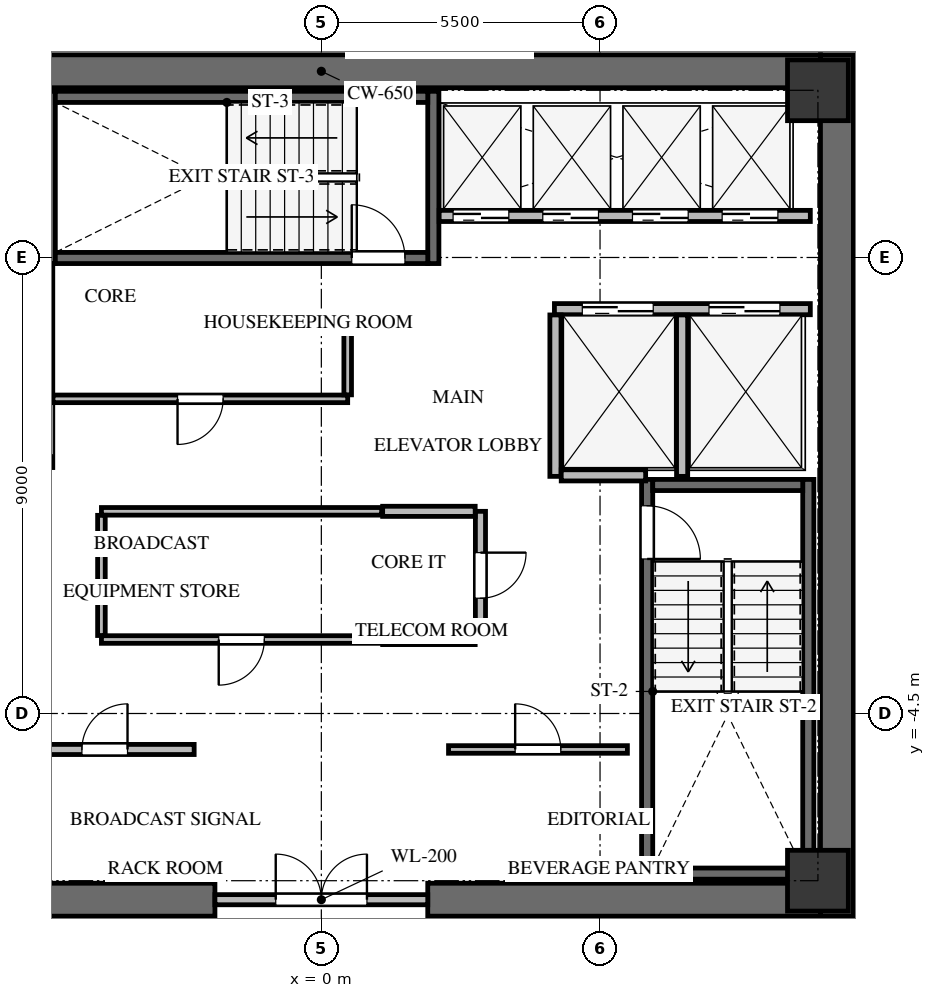
"""IFC4 building model, lengths in metres.
Left out: names, types, materials, properties, quantities, classifications, styles, units other than length and angle.
Written with IfcOpenShell. Run it as: python <this file> out.ifc"""

import sys

from ifc_helpers import new_model, si_unit, direction, frame, frame_2d, origin, origin_2d, place, context, subcontext, project, spatial, rectangle, extrude, source, transform, mapped, element, fill, save


model = new_model("IFC4")
c1 = context("Model", 3, precision=1e-05, world=origin(), true_north=direction((0.0, 1.0)))
c2 = subcontext(c1, "Body", "Model", "MODEL_VIEW")
j1 = project(units=[si_unit("LENGTHUNIT", "METRE"), si_unit("PLANEANGLEUNIT", "RADIAN")], contexts=[c1])
p1 = place(None, origin())
s1 = spatial("IfcSite", under=j1, at=p1, CompositionType="ELEMENT")
p2 = place(p1, origin())
s2 = spatial("IfcBuilding", under=s1, at=p2, CompositionType="ELEMENT")
p3 = place(p2, frame((0.0, 0.0, 196.9)))
s3 = spatial("IfcBuildingStorey", under=s2, at=p3, CompositionType="ELEMENT", Elevation=196.9)
p4 = place(p3, frame((10.175, -8.5, 0.0), z_axis=(0.0, 0.0, 1.0), x_axis=(0.0, 1.0, 0.0)))
e1 = element("IfcWall", 1, at=p4, inside=s3, PredefinedType="SHEAR", context=c2, shape_type="SweptSolid", body=[
    extrude(rectangle(XDim=17.0, YDim=0.65, at=frame_2d((8.5, 0.0))), origin(), (0.0, 0.0, 1.0), 3.3),
])
for number, where, z_axis, x_axis in (
    (2, (-9.85, -8.175, 0.0), (0.0, 0.0, 1.0), (1.0, 0.0, 0.0)),
    (3, (2.1, -8.175, 0.0), (0.0, 0.0, 1.0), (1.0, 0.0, 0.0)),
):
    element("IfcWall", number, at=place(p3, frame(where, z_axis=z_axis, x_axis=x_axis)), inside=s3, PredefinedType="SHEAR", context=c2, shape_type="SweptSolid", body=[
        extrude(rectangle(XDim=7.75, YDim=0.65, at=frame_2d((3.875, 0.0))), origin(), (0.0, 0.0, 1.0), 3.3),
    ])
p5 = place(p3, frame((-9.85, 8.175, 0.0), z_axis=(0.0, 0.0, 1.0), x_axis=(1.0, 0.0, 0.0)))
e4 = element("IfcWall", 4, at=p5, inside=s3, PredefinedType="SHEAR", context=c2, shape_type="SweptSolid", body=[
    extrude(rectangle(XDim=19.7, YDim=0.65, at=frame_2d((9.85, 0.0))), origin(), (0.0, 0.0, 1.0), 3.3),
])
p6 = place(p3, frame((9.61, -7.77, -0.24), z_axis=(0.0, 0.0, 1.0), x_axis=(0.0, 1.0, 0.0)))
e5 = element("IfcWall", 5, at=p6, inside=s3, PredefinedType="SHEAR", context=c2, shape_type="SweptSolid", body=[
    extrude(rectangle(XDim=7.89, YDim=0.22, at=frame_2d((3.945, 0.0))), origin(), (0.0, 0.0, 1.0), 3.3),
])
p7 = place(p3, frame((6.43, 0.12, -0.24), z_axis=(0.0, 0.0, 1.0), x_axis=(0.0, -1.0, 0.0)))
e6 = element("IfcWall", 6, at=p7, inside=s3, PredefinedType="SHEAR", context=c2, shape_type="SweptSolid", body=[
    extrude(rectangle(XDim=7.89, YDim=0.22, at=frame_2d((3.945, 0.0))), origin(), (0.0, 0.0, 1.0), 3.3),
])
p8 = place(p7, frame((0.52, 0.0, 0.0)))
e7 = element("IfcOpeningElement", 7, at=p8, cuts=e6, PredefinedType="OPENING", context=c2, shape_type="SweptSolid", body=[
    extrude(rectangle(XDim=1.05, YDim=2.15, at=frame_2d((0.525, 1.075))), frame((0.0, 0.12, 0.0), z_axis=(0.0, -1.0, 0.0), x_axis=(1.0, 0.0, 0.0)), (0.0, 0.0, 1.0), 0.24),
])
for number, where, z_axis, x_axis in (
    (8, (6.54, -7.66, -0.24), (0.0, 0.0, 1.0), (1.0, 0.0, 0.0)),
    (9, (9.5, 0.01, -0.24), (0.0, 0.0, 1.0), (-1.0, 0.0, 0.0)),
):
    element("IfcWall", number, at=place(p3, frame(where, z_axis=z_axis, x_axis=x_axis)), inside=s3, PredefinedType="SHEAR", context=c2, shape_type="SweptSolid", body=[
        extrude(rectangle(XDim=2.96, YDim=0.22, at=frame_2d((1.48, 0.0))), origin(), (0.0, 0.0, 1.0), 3.3),
    ])
for number, where, z_axis, x_axis in (
    (10, (2.21, 4.38, -0.24), (0.0, 0.0, 1.0), (0.0, 1.0, 0.0)),
    (11, (-5.36, 7.78, -0.24), (0.0, 0.0, 1.0), (0.0, -1.0, 0.0)),
):
    element("IfcWall", number, at=place(p3, frame(where, z_axis=z_axis, x_axis=x_axis)), inside=s3, PredefinedType="SHEAR", context=c2, shape_type="SweptSolid", body=[
        extrude(rectangle(XDim=3.4, YDim=0.22, at=frame_2d((1.7, 0.0))), origin(), (0.0, 0.0, 1.0), 3.3),
    ])
p9 = place(p3, frame((-5.25, 4.49, -0.24), z_axis=(0.0, 0.0, 1.0), x_axis=(1.0, 0.0, 0.0)))
e12 = element("IfcWall", 12, at=p9, inside=s3, PredefinedType="SHEAR", context=c2, shape_type="SweptSolid", body=[
    extrude(rectangle(XDim=7.35, YDim=0.22, at=frame_2d((3.675, 0.0))), origin(), (0.0, 0.0, 1.0), 3.3),
])
p10 = place(p9, frame((5.85, 0.0, 0.0)))
e13 = element("IfcOpeningElement", 13, at=p10, cuts=e12, PredefinedType="OPENING", context=c2, shape_type="SweptSolid", body=[
    extrude(rectangle(XDim=1.05, YDim=2.15, at=frame_2d((0.525, 1.075))), frame((0.0, 0.12, 0.0), z_axis=(0.0, -1.0, 0.0), x_axis=(1.0, 0.0, 0.0)), (0.0, 0.0, 1.0), 0.24),
])
p11 = place(p3, frame((2.1, 7.67, -0.24), z_axis=(0.0, 0.0, 1.0), x_axis=(-1.0, 0.0, 0.0)))
e14 = element("IfcWall", 14, at=p11, inside=s3, PredefinedType="SHEAR", context=c2, shape_type="SweptSolid", body=[
    extrude(rectangle(XDim=7.35, YDim=0.22, at=frame_2d((3.675, 0.0))), origin(), (0.0, 0.0, 1.0), 3.3),
])
m1 = source(origin(), c2, "Body", "SweptSolid", [
    extrude(rectangle(XDim=1.2, YDim=1.2, at=origin_2d()), origin(), (0.0, 0.0, 1.0), 3.3),
])
for number, where, z_axis, x_axis in (
    (15, (9.8, -7.8, -0.24), (0.0, 0.0, 1.0), (1.0, 0.0, 0.0)),
    (16, (9.8, 7.8, -0.24), (0.0, 0.0, 1.0), (1.0, 0.0, 0.0)),
):
    element("IfcColumn", number, at=place(p3, frame(where, z_axis=z_axis, x_axis=x_axis)), inside=s3, PredefinedType="COLUMN", context=c2, shape_type="MappedRepresentation", body=[
        mapped(m1, transform((0.0, 0.0, 0.0), x_axis=(1.0, 0.0, 0.0), y_axis=(0.0, 1.0, 0.0), z_axis=(0.0, 0.0, 1.0), scale=1.0)),
    ])
p12 = place(p3, frame((-2.1, -8.175, 0.0), z_axis=(0.0, 0.0, 1.0), x_axis=(1.0, 0.0, 0.0)))
e17 = element("IfcWall", 17, at=p12, inside=s3, PredefinedType="SOLIDWALL", context=c2, shape_type="SweptSolid", body=[
    extrude(rectangle(XDim=4.2, YDim=0.2, at=frame_2d((2.1, 0.0))), origin(), (0.0, 0.0, 1.0), 3.045),
])
p13 = place(p12, frame((1.2, 0.0, 0.0)))
e18 = element("IfcOpeningElement", 18, at=p13, cuts=e17, PredefinedType="OPENING", context=c2, shape_type="SweptSolid", body=[
    extrude(rectangle(XDim=1.8, YDim=2.15, at=frame_2d((0.9, 1.075))), frame((0.0, 0.11, 0.0), z_axis=(0.0, -1.0, 0.0), x_axis=(1.0, 0.0, 0.0)), (0.0, 0.0, 1.0), 0.22),
])
p14 = place(p3, frame((-5.4, 0.354, 0.0), z_axis=(0.0, 0.0, 1.0), x_axis=(0.0, 1.0, 0.0)))
e19 = element("IfcWall", 19, at=p14, inside=s3, PredefinedType="SOLIDWALL", context=c2, shape_type="SweptSolid", body=[
    extrude(rectangle(XDim=4.026, YDim=0.2, at=frame_2d((2.013, 0.0))), origin(), (0.0, 0.0, 1.0), 3.045),
])
p15 = place(p14, frame((0.246, 0.0, 0.0)))
e20 = element("IfcOpeningElement", 20, at=p15, cuts=e19, PredefinedType="OPENING", context=c2, shape_type="SweptSolid", body=[
    extrude(rectangle(XDim=1.0, YDim=2.15, at=frame_2d((0.5, 1.075))), frame((0.0, 0.11, 0.0), z_axis=(0.0, -1.0, 0.0), x_axis=(1.0, 0.0, 0.0)), (0.0, 0.0, 1.0), 0.22),
])
p16 = place(p3, frame((4.6, 3.48, 0.0), z_axis=(0.0, 0.0, 1.0), x_axis=(1.0, 0.0, 0.0)))
e21 = element("IfcWall", 21, at=p16, inside=s3, PredefinedType="SOLIDWALL", context=c2, shape_type="SweptSolid", body=[
    extrude(rectangle(XDim=5.05, YDim=0.22, at=frame_2d((2.525, 0.0))), origin(), (0.0, 0.0, 1.0), 3.045),
])
p17 = place(p16, frame((0.55, 0.0, 0.0)))
e22 = element("IfcOpeningElement", 22, at=p17, cuts=e21, PredefinedType="OPENING", context=c2, shape_type="SweptSolid", body=[
    extrude(rectangle(XDim=1.4, YDim=2.15, at=frame_2d((0.7, 1.075))), frame((0.0, 0.12, 0.0), z_axis=(0.0, -1.0, 0.0), x_axis=(1.0, 0.0, 0.0)), (0.0, 0.0, 1.0), 0.24),
])
p18 = place(p16, frame((3.05, 0.0, 0.0)))
e23 = element("IfcOpeningElement", 23, at=p18, cuts=e21, PredefinedType="OPENING", context=c2, shape_type="SweptSolid", body=[
    extrude(rectangle(XDim=1.4, YDim=2.15, at=frame_2d((0.7, 1.075))), frame((0.0, 0.12, 0.0), z_axis=(0.0, -1.0, 0.0), x_axis=(1.0, 0.0, 0.0)), (0.0, 0.0, 1.0), 0.24),
])
for number, where, z_axis, x_axis in (
    (24, (4.62, 0.18, 0.0), (0.0, 0.0, 1.0), (0.0, 1.0, 0.0)),
    (25, (7.12, 0.18, 0.0), (0.0, 0.0, 1.0), (0.0, 1.0, 0.0)),
):
    element("IfcWall", number, at=place(p3, frame(where, z_axis=z_axis, x_axis=x_axis)), inside=s3, PredefinedType="SOLIDWALL", context=c2, shape_type="SweptSolid", body=[
        extrude(rectangle(XDim=3.186, YDim=0.22, at=frame_2d((1.593, 0.0))), origin(), (0.0, 0.0, 1.0), 3.045),
    ])
p19 = place(p3, frame((4.734, 0.2, 0.0), z_axis=(0.0, 0.0, 1.0), x_axis=(1.0, 0.0, 0.0)))
e26 = element("IfcWall", 26, at=p19, inside=s3, PredefinedType="SOLIDWALL", context=c2, shape_type="SweptSolid", body=[
    extrude(rectangle(XDim=1.666, YDim=0.22, at=frame_2d((0.833, 0.0))), origin(), (0.0, 0.0, 1.0), 3.045),
])
p20 = place(p3, frame((2.325, 5.32, 0.0), z_axis=(0.0, 0.0, 1.0), x_axis=(1.0, 0.0, 0.0)))
e27 = element("IfcWall", 27, at=p20, inside=s3, PredefinedType="SOLIDWALL", context=c2, shape_type="SweptSolid", body=[
    extrude(rectangle(XDim=7.325, YDim=0.22, at=frame_2d((3.663, 0.0))), origin(), (0.0, 0.0, 1.0), 3.045),
])
p21 = place(p20, frame((0.275, 0.0, 0.0)))
e28 = element("IfcOpeningElement", 28, at=p21, cuts=e27, PredefinedType="OPENING", context=c2, shape_type="SweptSolid", body=[
    extrude(rectangle(XDim=1.1, YDim=2.15, at=frame_2d((0.55, 1.075))), frame((0.0, 0.12, 0.0), z_axis=(0.0, -1.0, 0.0), x_axis=(1.0, 0.0, 0.0)), (0.0, 0.0, 1.0), 0.24),
])
p22 = place(p20, frame((2.045, 0.0, 0.0)))
e29 = element("IfcOpeningElement", 29, at=p22, cuts=e27, PredefinedType="OPENING", context=c2, shape_type="SweptSolid", body=[
    extrude(rectangle(XDim=1.1, YDim=2.15, at=frame_2d((0.55, 1.075))), frame((0.0, 0.12, 0.0), z_axis=(0.0, -1.0, 0.0), x_axis=(1.0, 0.0, 0.0)), (0.0, 0.0, 1.0), 0.24),
])
p23 = place(p20, frame((3.815, 0.0, 0.0)))
e30 = element("IfcOpeningElement", 30, at=p23, cuts=e27, PredefinedType="OPENING", context=c2, shape_type="SweptSolid", body=[
    extrude(rectangle(XDim=1.1, YDim=2.15, at=frame_2d((0.55, 1.075))), frame((0.0, 0.12, 0.0), z_axis=(0.0, -1.0, 0.0), x_axis=(1.0, 0.0, 0.0)), (0.0, 0.0, 1.0), 0.24),
])
p24 = place(p20, frame((5.585, 0.0, 0.0)))
e31 = element("IfcOpeningElement", 31, at=p24, cuts=e27, PredefinedType="OPENING", context=c2, shape_type="SweptSolid", body=[
    extrude(rectangle(XDim=1.1, YDim=2.15, at=frame_2d((0.55, 1.075))), frame((0.0, 0.12, 0.0), z_axis=(0.0, -1.0, 0.0), x_axis=(1.0, 0.0, 0.0)), (0.0, 0.0, 1.0), 0.24),
])
p25 = place(p3, frame((-6.04, -5.21, 0.0), z_axis=(0.0, 0.0, 1.0), x_axis=(1.0, 0.0, 0.0)))
e32 = element("IfcWall", 32, at=p25, inside=s3, PredefinedType="SOLIDWALL", context=c2, shape_type="SweptSolid", body=[
    extrude(rectangle(XDim=3.53, YDim=0.2, at=frame_2d((1.765, 0.0))), origin(), (0.0, 0.0, 1.0), 3.045),
])
p26 = place(p25, frame((1.315, 0.0, 0.0)))
e33 = element("IfcOpeningElement", 33, at=p26, cuts=e32, PredefinedType="OPENING", context=c2, shape_type="SweptSolid", body=[
    extrude(rectangle(XDim=0.9, YDim=2.05, at=frame_2d((0.45, 1.025))), frame((0.0, 0.11, 0.0), z_axis=(0.0, -1.0, 0.0), x_axis=(1.0, 0.0, 0.0)), (0.0, 0.0, 1.0), 0.22),
])
p27 = place(p3, frame((2.51, -5.21, 0.0), z_axis=(0.0, 0.0, 1.0), x_axis=(1.0, 0.0, 0.0)))
e34 = element("IfcWall", 34, at=p27, inside=s3, PredefinedType="PARTITIONING", context=c2, shape_type="SweptSolid", body=[
    extrude(rectangle(XDim=3.53, YDim=0.15, at=frame_2d((1.765, 0.0))), origin(), (0.0, 0.0, 1.0), 3.045),
])
p28 = place(p27, frame((1.315, 0.0, 0.0)))
e35 = element("IfcOpeningElement", 35, at=p28, cuts=e34, PredefinedType="OPENING", context=c2, shape_type="SweptSolid", body=[
    extrude(rectangle(XDim=0.9, YDim=2.05, at=frame_2d((0.45, 1.025))), frame((0.0, 0.085, 0.0), z_axis=(0.0, -1.0, 0.0), x_axis=(1.0, 0.0, 0.0)), (0.0, 0.0, 1.0), 0.17),
])
p29 = place(p3, frame((1.19, -3.04, 0.0), z_axis=(0.0, 0.0, 1.0), x_axis=(-1.0, 0.0, 0.0)))
e36 = element("IfcWall", 36, at=p29, inside=s3, PredefinedType="PARTITIONING", context=c2, shape_type="SweptSolid", body=[
    extrude(rectangle(XDim=5.53, YDim=0.15, at=frame_2d((2.765, 0.0))), origin(), (0.0, 0.0, 1.0), 3.045),
])
p30 = place(p29, frame((2.315, 0.0, 0.0)))
e37 = element("IfcOpeningElement", 37, at=p30, cuts=e36, PredefinedType="OPENING", context=c2, shape_type="SweptSolid", body=[
    extrude(rectangle(XDim=0.9, YDim=2.05, at=frame_2d((0.45, 1.025))), frame((0.0, 0.085, 0.0), z_axis=(0.0, -1.0, 0.0), x_axis=(1.0, 0.0, 0.0)), (0.0, 0.0, 1.0), 0.17),
])
p31 = place(p3, frame((-4.34, -0.51, 0.0), z_axis=(0.0, 0.0, 1.0), x_axis=(1.0, 0.0, 0.0)))
e38 = element("IfcWall", 38, at=p31, inside=s3, PredefinedType="PARTITIONING", context=c2, shape_type="SweptSolid", body=[
    extrude(rectangle(XDim=5.53, YDim=0.15, at=frame_2d((2.765, 0.0))), origin(), (0.0, 0.0, 1.0), 3.045),
])
p32 = place(p3, frame((-4.34, -2.961, 0.0), z_axis=(0.0, 0.0, 1.0), x_axis=(0.0, 1.0, 0.0)))
e39 = element("IfcWall", 39, at=p32, inside=s3, PredefinedType="PARTITIONING", context=c2, shape_type="SweptSolid", body=[
    extrude(rectangle(XDim=2.372, YDim=0.15, at=frame_2d((1.186, 0.0))), origin(), (0.0, 0.0, 1.0), 3.045),
])
p33 = place(p3, frame((3.14, -0.51, 0.0), z_axis=(0.0, 0.0, 1.0), x_axis=(0.0, -1.0, 0.0)))
e40 = element("IfcWall", 40, at=p33, inside=s3, PredefinedType="SOLIDWALL", context=c2, shape_type="SweptSolid", body=[
    extrude(rectangle(XDim=2.53, YDim=0.2, at=frame_2d((1.265, 0.0))), origin(), (0.0, 0.0, 1.0), 3.045),
])
p34 = place(p33, frame((0.815, 0.0, 0.0)))
e41 = element("IfcOpeningElement", 41, at=p34, cuts=e40, PredefinedType="OPENING", context=c2, shape_type="SweptSolid", body=[
    extrude(rectangle(XDim=0.9, YDim=2.05, at=frame_2d((0.45, 1.025))), frame((0.0, 0.11, 0.0), z_axis=(0.0, -1.0, 0.0), x_axis=(1.0, 0.0, 0.0)), (0.0, 0.0, 1.0), 0.22),
])
for number, where, z_axis, x_axis in (
    (42, (3.036, -3.04, 0.0), (0.0, 0.0, 1.0), (-1.0, 0.0, 0.0)),
    (43, (1.21, -0.51, 0.0), (0.0, 0.0, 1.0), (1.0, 0.0, 0.0)),
):
    element("IfcWall", number, at=place(p3, frame(where, z_axis=z_axis, x_axis=x_axis)), inside=s3, PredefinedType="SOLIDWALL", context=c2, shape_type="SweptSolid", body=[
        extrude(rectangle(XDim=1.826, YDim=0.2, at=frame_2d((0.913, 0.0))), origin(), (0.0, 0.0, 1.0), 3.045),
    ])
p35 = place(p3, frame((0.52, 1.71, 0.0), z_axis=(0.0, 0.0, 1.0), x_axis=(-1.0, 0.0, 0.0)))
e44 = element("IfcWall", 44, at=p35, inside=s3, PredefinedType="PARTITIONING", context=c2, shape_type="SweptSolid", body=[
    extrude(rectangle(XDim=5.816, YDim=0.15, at=frame_2d((2.908, 0.0))), origin(), (0.0, 0.0, 1.0), 3.045),
])
p36 = place(p35, frame((2.458, 0.0, 0.0)))
e45 = element("IfcOpeningElement", 45, at=p36, cuts=e44, PredefinedType="OPENING", context=c2, shape_type="SweptSolid", body=[
    extrude(rectangle(XDim=0.9, YDim=2.05, at=frame_2d((0.45, 1.025))), frame((0.0, 0.085, 0.0), z_axis=(0.0, -1.0, 0.0), x_axis=(1.0, 0.0, 0.0)), (0.0, 0.0, 1.0), 0.17),
])
p37 = place(p3, frame((0.52, 3.3, 0.0), z_axis=(0.0, 0.0, 1.0), x_axis=(0.0, -1.0, 0.0)))
e46 = element("IfcWall", 46, at=p37, inside=s3, PredefinedType="PARTITIONING", context=c2, shape_type="SweptSolid", body=[
    extrude(rectangle(XDim=1.511, YDim=0.15, at=frame_2d((0.755, 0.0))), origin(), (0.0, 0.0, 1.0), 3.045),
])
m2 = source(origin(), c2, "Body", "SweptSolid", [
    extrude(rectangle(XDim=1.05, YDim=2.15, at=frame_2d((0.525, 1.075))), frame((0.0, 0.025, 0.0), z_axis=(0.0, -1.0, 0.0), x_axis=(1.0, 0.0, 0.0)), (0.0, 0.0, 1.0), 0.05),
])
p38 = place(p8, origin())
e47 = element("IfcDoor", 47, at=p38, inside=s3, OperationType="SINGLE_SWING_RIGHT", PredefinedType="DOOR", context=c2, shape_type="MappedRepresentation", body=[
    mapped(m2, transform((0.0, 0.0, 0.0), x_axis=(1.0, 0.0, 0.0), y_axis=(0.0, 1.0, 0.0), z_axis=(0.0, 0.0, 1.0), scale=1.0)),
])
fill(e7, e47)
m3 = source(origin(), c2, "Body", "SweptSolid", [
    extrude(rectangle(XDim=1.05, YDim=2.15, at=frame_2d((0.525, 1.075))), frame((0.0, 0.025, 0.0), z_axis=(0.0, -1.0, 0.0), x_axis=(1.0, 0.0, 0.0)), (0.0, 0.0, 1.0), 0.05),
])
p39 = place(p10, origin())
e48 = element("IfcDoor", 48, at=p39, inside=s3, OperationType="SINGLE_SWING_LEFT", PredefinedType="DOOR", context=c2, shape_type="MappedRepresentation", body=[
    mapped(m3, transform((0.0, 0.0, 0.0), x_axis=(1.0, 0.0, 0.0), y_axis=(0.0, 1.0, 0.0), z_axis=(0.0, 0.0, 1.0), scale=1.0)),
])
fill(e13, e48)
m4 = source(origin(), c2, "Body", "SweptSolid", [
    extrude(rectangle(XDim=1.8, YDim=2.15, at=frame_2d((0.9, 1.075))), frame((0.0, 0.025, 0.0), z_axis=(0.0, -1.0, 0.0), x_axis=(1.0, 0.0, 0.0)), (0.0, 0.0, 1.0), 0.05),
])
p40 = place(p13, origin())
e49 = element("IfcDoor", 49, at=p40, inside=s3, OperationType="DOUBLE_DOOR_SINGLE_SWING", PredefinedType="DOOR", context=c2, shape_type="MappedRepresentation", body=[
    mapped(m4, transform((0.0, 0.0, 0.0), x_axis=(1.0, 0.0, 0.0), y_axis=(0.0, 1.0, 0.0), z_axis=(0.0, 0.0, 1.0), scale=1.0)),
])
fill(e18, e49)
m5 = source(origin(), c2, "Body", "SweptSolid", [
    extrude(rectangle(XDim=1.4, YDim=2.15, at=frame_2d((0.7, 1.075))), frame((0.0, 0.025, 0.0), z_axis=(0.0, -1.0, 0.0), x_axis=(1.0, 0.0, 0.0)), (0.0, 0.0, 1.0), 0.05),
])
p41 = place(p17, origin())
e50 = element("IfcDoor", 50, at=p41, inside=s3, OperationType="DOUBLE_DOOR_SLIDING", PredefinedType="DOOR", context=c2, shape_type="MappedRepresentation", body=[
    mapped(m5, transform((0.0, 0.0, 0.0), x_axis=(1.0, 0.0, 0.0), y_axis=(0.0, 1.0, 0.0), z_axis=(0.0, 0.0, 1.0), scale=1.0)),
])
fill(e22, e50)
p42 = place(p18, origin())
e51 = element("IfcDoor", 51, at=p42, inside=s3, OperationType="DOUBLE_DOOR_SLIDING", PredefinedType="DOOR", context=c2, shape_type="MappedRepresentation", body=[
    mapped(m5, transform((0.0, 0.0, 0.0), x_axis=(1.0, 0.0, 0.0), y_axis=(0.0, 1.0, 0.0), z_axis=(0.0, 0.0, 1.0), scale=1.0)),
])
fill(e23, e51)
m6 = source(origin(), c2, "Body", "SweptSolid", [
    extrude(rectangle(XDim=1.1, YDim=2.15, at=frame_2d((0.55, 1.075))), frame((0.0, 0.025, 0.0), z_axis=(0.0, -1.0, 0.0), x_axis=(1.0, 0.0, 0.0)), (0.0, 0.0, 1.0), 0.05),
])
p43 = place(p21, origin())
e52 = element("IfcDoor", 52, at=p43, inside=s3, OperationType="DOUBLE_DOOR_SLIDING", PredefinedType="DOOR", context=c2, shape_type="MappedRepresentation", body=[
    mapped(m6, transform((0.0, 0.0, 0.0), x_axis=(1.0, 0.0, 0.0), y_axis=(0.0, 1.0, 0.0), z_axis=(0.0, 0.0, 1.0), scale=1.0)),
])
fill(e28, e52)
p44 = place(p22, origin())
e53 = element("IfcDoor", 53, at=p44, inside=s3, OperationType="DOUBLE_DOOR_SLIDING", PredefinedType="DOOR", context=c2, shape_type="MappedRepresentation", body=[
    mapped(m6, transform((0.0, 0.0, 0.0), x_axis=(1.0, 0.0, 0.0), y_axis=(0.0, 1.0, 0.0), z_axis=(0.0, 0.0, 1.0), scale=1.0)),
])
fill(e29, e53)
p45 = place(p23, origin())
e54 = element("IfcDoor", 54, at=p45, inside=s3, OperationType="DOUBLE_DOOR_SLIDING", PredefinedType="DOOR", context=c2, shape_type="MappedRepresentation", body=[
    mapped(m6, transform((0.0, 0.0, 0.0), x_axis=(1.0, 0.0, 0.0), y_axis=(0.0, 1.0, 0.0), z_axis=(0.0, 0.0, 1.0), scale=1.0)),
])
fill(e30, e54)
p46 = place(p24, origin())
e55 = element("IfcDoor", 55, at=p46, inside=s3, OperationType="DOUBLE_DOOR_SLIDING", PredefinedType="DOOR", context=c2, shape_type="MappedRepresentation", body=[
    mapped(m6, transform((0.0, 0.0, 0.0), x_axis=(1.0, 0.0, 0.0), y_axis=(0.0, 1.0, 0.0), z_axis=(0.0, 0.0, 1.0), scale=1.0)),
])
fill(e31, e55)
m7 = source(origin(), c2, "Body", "SweptSolid", [
    extrude(rectangle(XDim=0.9, YDim=2.05, at=frame_2d((0.45, 1.025))), frame((0.0, 0.025, 0.0), z_axis=(0.0, -1.0, 0.0), x_axis=(1.0, 0.0, 0.0)), (0.0, 0.0, 1.0), 0.05),
])
p47 = place(p26, origin())
e56 = element("IfcDoor", 56, at=p47, inside=s3, OperationType="SINGLE_SWING_RIGHT", PredefinedType="DOOR", context=c2, shape_type="MappedRepresentation", body=[
    mapped(m7, transform((0.0, 0.0, 0.0), x_axis=(1.0, 0.0, 0.0), y_axis=(0.0, 1.0, 0.0), z_axis=(0.0, 0.0, 1.0), scale=1.0)),
])
fill(e33, e56)
m8 = source(origin(), c2, "Body", "SweptSolid", [
    extrude(rectangle(XDim=0.9, YDim=2.05, at=frame_2d((0.45, 1.025))), frame((0.0, 0.025, 0.0), z_axis=(0.0, -1.0, 0.0), x_axis=(1.0, 0.0, 0.0)), (0.0, 0.0, 1.0), 0.05),
])
p48 = place(p28, origin())
e57 = element("IfcDoor", 57, at=p48, inside=s3, OperationType="SINGLE_SWING_LEFT", PredefinedType="DOOR", context=c2, shape_type="MappedRepresentation", body=[
    mapped(m8, transform((0.0, 0.0, 0.0), x_axis=(1.0, 0.0, 0.0), y_axis=(0.0, 1.0, 0.0), z_axis=(0.0, 0.0, 1.0), scale=1.0)),
])
fill(e35, e57)
p49 = place(p30, origin())
e58 = element("IfcDoor", 58, at=p49, inside=s3, OperationType="SINGLE_SWING_RIGHT", PredefinedType="DOOR", context=c2, shape_type="MappedRepresentation", body=[
    mapped(m7, transform((0.0, 0.0, 0.0), x_axis=(1.0, 0.0, 0.0), y_axis=(0.0, 1.0, 0.0), z_axis=(0.0, 0.0, 1.0), scale=1.0)),
])
fill(e37, e58)
p50 = place(p34, origin())
e59 = element("IfcDoor", 59, at=p50, inside=s3, OperationType="SINGLE_SWING_LEFT", PredefinedType="DOOR", context=c2, shape_type="MappedRepresentation", body=[
    mapped(m8, transform((0.0, 0.0, 0.0), x_axis=(1.0, 0.0, 0.0), y_axis=(0.0, 1.0, 0.0), z_axis=(0.0, 0.0, 1.0), scale=1.0)),
])
fill(e41, e59)
p51 = place(p36, origin())
e60 = element("IfcDoor", 60, at=p51, inside=s3, OperationType="SINGLE_SWING_RIGHT", PredefinedType="DOOR", context=c2, shape_type="MappedRepresentation", body=[
    mapped(m7, transform((0.0, 0.0, 0.0), x_axis=(1.0, 0.0, 0.0), y_axis=(0.0, 1.0, 0.0), z_axis=(0.0, 0.0, 1.0), scale=1.0)),
])
fill(e45, e60)
save(model, sys.argv[1])
